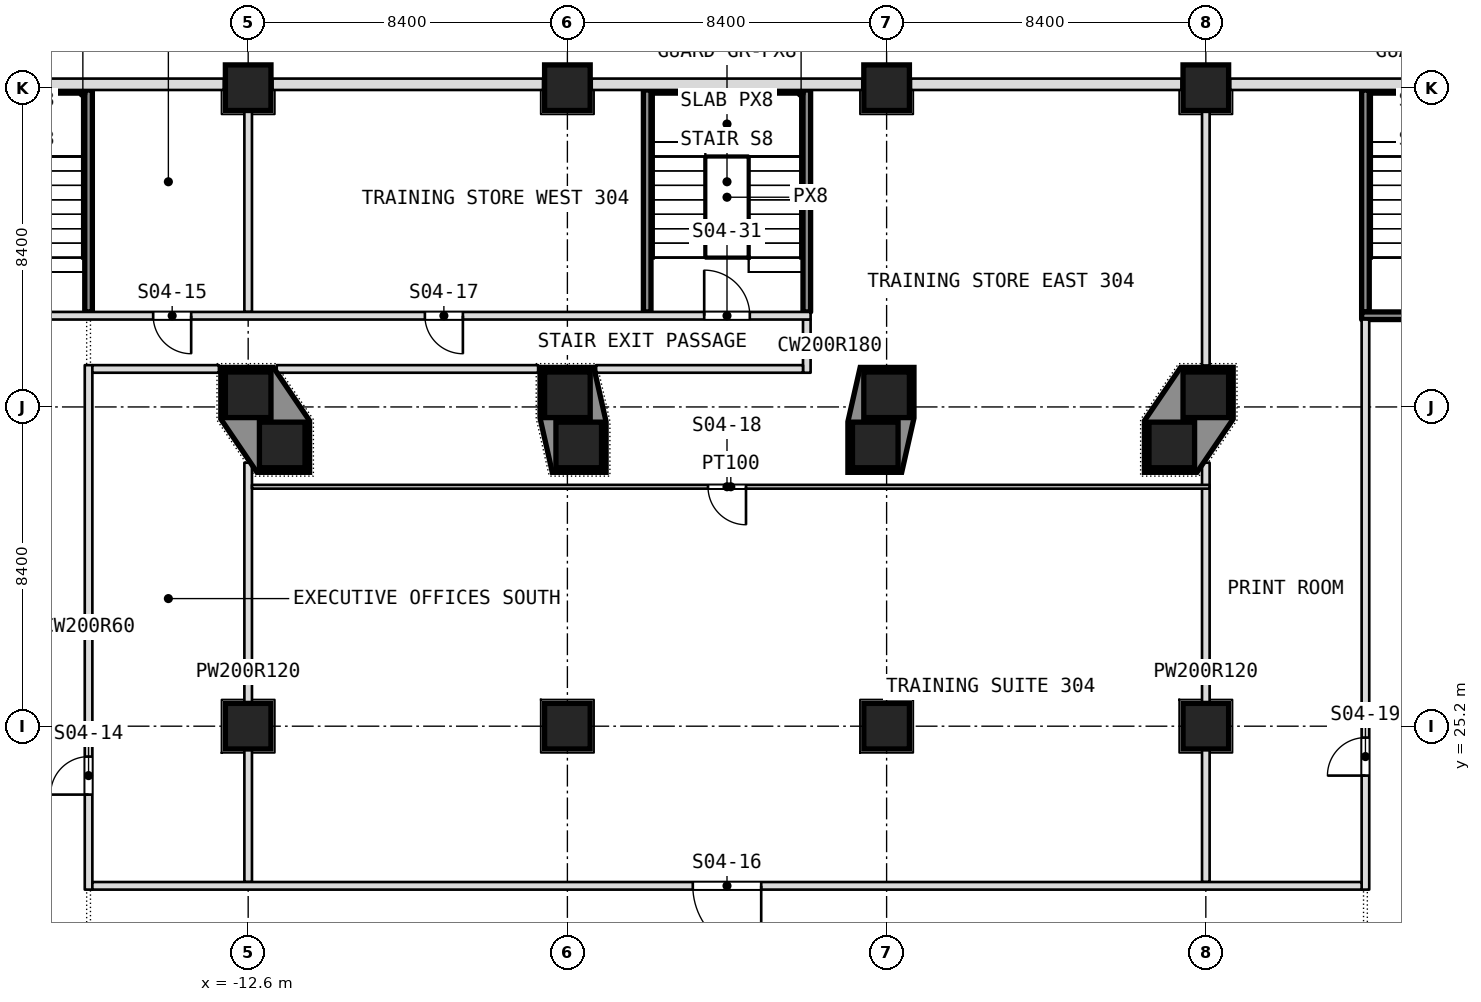
"""IFC4 building model, lengths in metres.
Left out: names, types, materials, properties, quantities, classifications, styles, units other than length and angle.
Written with IfcOpenShell. Run it as: python <this file> out.ifc"""

import sys

from ifc_helpers import new_model, si_unit, direction, frame, frame_2d, origin, origin_2d, place, context, subcontext, project, spatial, polyline, rectangle, outline, extrude, element, fill, save


model = new_model("IFC4")
c1 = context("Model", 3, precision=1e-05, world=origin(), true_north=direction((0.0, 1.0)))
c2 = subcontext(c1, "Body", "Model", "MODEL_VIEW")
j1 = project(units=[si_unit("LENGTHUNIT", "METRE"), si_unit("PLANEANGLEUNIT", "RADIAN")], contexts=[c1])
p1 = place(None, origin())
s1 = spatial("IfcSite", under=j1, at=p1, CompositionType="ELEMENT")
p2 = place(p1, origin())
s2 = spatial("IfcBuilding", under=s1, at=p2, CompositionType="ELEMENT")
p3 = place(p2, frame((0.0, 0.0, 21.0)))
s3 = spatial("IfcBuildingStorey", under=s2, at=p3, CompositionType="ELEMENT", Elevation=21.0)
for number, where, z_axis, x_axis in (
    (1, (-12.6, 25.2, 0.0), (0.0, 0.0, 1.0), (1.0, 0.0, 0.0)),
    (2, (-4.2, 25.2, 0.0), (0.0, 0.0, 1.0), (1.0, 0.0, 0.0)),
    (3, (4.2, 25.2, 0.0), (0.0, 0.0, 1.0), (1.0, 0.0, 0.0)),
    (4, (12.6, 25.2, 0.0), (0.0, 0.0, 1.0), (1.0, 0.0, 0.0)),
    (5, (-12.6, 33.92, 0.0), (0.0, 0.0, 1.0), (1.0, 0.0, 0.0)),
    (6, (-4.2, 33.92, 0.0), (0.0, 0.0, 1.0), (1.0, 0.0, 0.0)),
    (7, (4.2, 33.92, 0.0), (0.0, 0.0, 1.0), (1.0, 0.0, 0.0)),
    (8, (12.6, 33.92, 0.0), (0.0, 0.0, 1.0), (1.0, 0.0, 0.0)),
    (9, (-12.6, 42.0, 0.0), (0.0, 0.0, 1.0), (1.0, 0.0, 0.0)),
    (10, (-4.2, 42.0, 0.0), (0.0, 0.0, 1.0), (1.0, 0.0, 0.0)),
    (11, (4.2, 42.0, 0.0), (0.0, 0.0, 1.0), (1.0, 0.0, 0.0)),
    (12, (12.6, 42.0, 0.0), (0.0, 0.0, 1.0), (1.0, 0.0, 0.0)),
    (13, (-11.704, 32.6, 0.0), (0.0, 0.0, 1.0), (1.0, 0.0, 0.0)),
    (14, (-3.901, 32.6, 0.0), (0.0, 0.0, 1.0), (1.0, 0.0, 0.0)),
    (15, (3.901, 32.6, 0.0), (0.0, 0.0, 1.0), (1.0, 0.0, 0.0)),
    (16, (11.704, 32.6, 0.0), (0.0, 0.0, 1.0), (1.0, 0.0, 0.0)),
):
    element("IfcColumn", number, at=place(p3, frame(where, z_axis=z_axis, x_axis=x_axis)), inside=s3, PredefinedType="COLUMN", context=c2, shape_type="SweptSolid", body=[
        extrude(rectangle(XDim=1.2, YDim=1.2, at=origin_2d()), origin(), (0.0, 0.0, 1.0), 5.0),
    ])
p4 = place(p3, frame((16.8, 20.9, 0.0), z_axis=(0.0, 0.0, 1.0), x_axis=(0.0, 1.0, 0.0)))
e17 = element("IfcWall", 17, at=p4, inside=s3, PredefinedType="PARTITIONING", context=c2, shape_type="SweptSolid", body=[
    extrude(rectangle(XDim=15.0, YDim=0.2, at=frame_2d((7.5, 0.0))), origin(), (0.0, 0.0, 1.0), 4.68),
])
p5 = place(p4, frame((3.0, 0.0, 0.0)))
e18 = element("IfcOpeningElement", 18, at=p5, cuts=e17, PredefinedType="OPENING", context=c2, shape_type="SweptSolid", body=[
    extrude(rectangle(XDim=1.0, YDim=2.1, at=frame_2d((0.5, 1.05))), frame((0.0, 0.1, 0.0), z_axis=(0.0, -1.0, 0.0), x_axis=(1.0, 0.0, 0.0)), (0.0, 0.0, 1.0), 0.2),
])
p6 = place(p3, frame((16.8, 36.1, 0.0), z_axis=(0.0, 0.0, 1.0), x_axis=(0.0, 1.0, 0.0)))
e19 = element("IfcWall", 19, at=p6, inside=s3, PredefinedType="PARTITIONING", context=c2, shape_type="SweptSolid", body=[
    extrude(rectangle(XDim=5.84, YDim=0.2, at=frame_2d((2.92, 0.0))), origin(), (0.0, 0.0, 1.0), 4.68),
])
p7 = place(p3, frame((12.6, 21.1, 0.0), z_axis=(0.0, 0.0, 1.0), x_axis=(0.0, 1.0, 0.0)))
e20 = element("IfcWall", 20, at=p7, inside=s3, PredefinedType="PARTITIONING", context=c2, shape_type="SweptSolid", body=[
    extrude(rectangle(XDim=11.033, YDim=0.2, at=frame_2d((5.517, 0.0))), origin(), (0.0, 0.0, 1.0), 4.68),
])
p8 = place(p3, frame((12.6, 34.69, 0.0), z_axis=(0.0, 0.0, 1.0), x_axis=(0.0, 1.0, 0.0)))
e21 = element("IfcWall", 21, at=p8, inside=s3, PredefinedType="PARTITIONING", context=c2, shape_type="SweptSolid", body=[
    extrude(rectangle(XDim=7.61, YDim=0.2, at=frame_2d((3.805, 0.0))), origin(), (0.0, 0.0, 1.0), 4.68),
])
p9 = place(p3, frame((2.1, 36.1, 0.0), z_axis=(0.0, 0.0, 1.0), x_axis=(0.0, 1.0, 0.0)))
e22 = element("IfcWall", 22, at=p9, inside=s3, PredefinedType="PARTITIONING", context=c2, shape_type="SweptSolid", body=[
    extrude(rectangle(XDim=5.84, YDim=0.2, at=frame_2d((2.92, 0.0))), origin(), (0.0, 0.0, 1.0), 4.68),
])
p10 = place(p3, frame((2.1, 34.5, 0.0), z_axis=(0.0, 0.0, 1.0), x_axis=(0.0, 1.0, 0.0)))
e23 = element("IfcWall", 23, at=p10, inside=s3, PredefinedType="PARTITIONING", context=c2, shape_type="SweptSolid", body=[
    extrude(rectangle(XDim=1.4, YDim=0.2, at=frame_2d((0.7, 0.0))), origin(), (0.0, 0.0, 1.0), 4.68),
])
p11 = place(p3, frame((-2.1, 36.1, 0.0), z_axis=(0.0, 0.0, 1.0), x_axis=(0.0, 1.0, 0.0)))
e24 = element("IfcWall", 24, at=p11, inside=s3, PredefinedType="PARTITIONING", context=c2, shape_type="SweptSolid", body=[
    extrude(rectangle(XDim=5.84, YDim=0.2, at=frame_2d((2.92, 0.0))), origin(), (0.0, 0.0, 1.0), 4.68),
])
p12 = place(p3, frame((-12.6, 21.1, 0.0), z_axis=(0.0, 0.0, 1.0), x_axis=(0.0, 1.0, 0.0)))
e25 = element("IfcWall", 25, at=p12, inside=s3, PredefinedType="PARTITIONING", context=c2, shape_type="SweptSolid", body=[
    extrude(rectangle(XDim=11.033, YDim=0.2, at=frame_2d((5.517, 0.0))), origin(), (0.0, 0.0, 1.0), 4.68),
])
p13 = place(p3, frame((-12.6, 36.1, 0.0), z_axis=(0.0, 0.0, 1.0), x_axis=(0.0, 1.0, 0.0)))
e26 = element("IfcWall", 26, at=p13, inside=s3, PredefinedType="PARTITIONING", context=c2, shape_type="SweptSolid", body=[
    extrude(rectangle(XDim=6.2, YDim=0.2, at=frame_2d((3.1, 0.0))), origin(), (0.0, 0.0, 1.0), 4.68),
])
p14 = place(p3, frame((-16.8, 20.9, 0.0), z_axis=(0.0, 0.0, 1.0), x_axis=(0.0, 1.0, 0.0)))
e27 = element("IfcWall", 27, at=p14, inside=s3, PredefinedType="PARTITIONING", context=c2, shape_type="SweptSolid", body=[
    extrude(rectangle(XDim=13.8, YDim=0.2, at=frame_2d((6.9, 0.0))), origin(), (0.0, 0.0, 1.0), 4.68),
])
p15 = place(p14, frame((2.5, 0.0, 0.0)))
e28 = element("IfcOpeningElement", 28, at=p15, cuts=e27, PredefinedType="OPENING", context=c2, shape_type="SweptSolid", body=[
    extrude(rectangle(XDim=1.0, YDim=2.1, at=frame_2d((0.5, 1.05))), frame((0.0, 0.1, 0.0), z_axis=(0.0, -1.0, 0.0), x_axis=(1.0, 0.0, 0.0)), (0.0, 0.0, 1.0), 0.2),
])
p16 = place(p3, frame((-16.8, 36.1, 0.0), z_axis=(0.0, 0.0, 1.0), x_axis=(0.0, 1.0, 0.0)))
e29 = element("IfcWall", 29, at=p16, inside=s3, PredefinedType="PARTITIONING", context=c2, shape_type="SweptSolid", body=[
    extrude(rectangle(XDim=5.84, YDim=0.2, at=frame_2d((2.92, 0.0))), origin(), (0.0, 0.0, 1.0), 4.68),
])
p17 = place(p3, frame((-16.7, 21.0, 0.0), z_axis=(0.0, 0.0, 1.0), x_axis=(1.0, 0.0, 0.0)))
e30 = element("IfcWall", 30, at=p17, inside=s3, PredefinedType="PARTITIONING", context=c2, shape_type="SweptSolid", body=[
    extrude(rectangle(XDim=33.4, YDim=0.2, at=frame_2d((16.7, 0.0))), origin(), (0.0, 0.0, 1.0), 4.68),
])
p18 = place(p17, frame((15.8, 0.0, 0.0)))
e31 = element("IfcOpeningElement", 31, at=p18, cuts=e30, PredefinedType="OPENING", context=c2, shape_type="SweptSolid", body=[
    extrude(rectangle(XDim=1.8, YDim=2.1, at=frame_2d((0.9, 1.05))), frame((0.0, 0.1, 0.0), z_axis=(0.0, -1.0, 0.0), x_axis=(1.0, 0.0, 0.0)), (0.0, 0.0, 1.0), 0.2),
])
p19 = place(p3, frame((-12.5, 31.5, 0.0), z_axis=(0.0, 0.0, 1.0), x_axis=(1.0, 0.0, 0.0)))
e32 = element("IfcWall", 32, at=p19, inside=s3, PredefinedType="PARTITIONING", context=c2, shape_type="SweptSolid", body=[
    extrude(rectangle(XDim=25.2, YDim=0.1, at=frame_2d((12.6, 0.0))), origin(), (0.0, 0.0, 1.0), 4.68),
])
p20 = place(p19, frame((12.0, 0.0, 0.0)))
e33 = element("IfcOpeningElement", 33, at=p20, cuts=e32, PredefinedType="OPENING", context=c2, shape_type="SweptSolid", body=[
    extrude(rectangle(XDim=1.0, YDim=2.1, at=frame_2d((0.5, 1.05))), frame((0.0, 0.05, 0.0), z_axis=(0.0, -1.0, 0.0), x_axis=(1.0, 0.0, 0.0)), (0.0, 0.0, 1.0), 0.1),
])
p21 = place(p3, frame((-16.7, 34.6, 0.0), z_axis=(0.0, 0.0, 1.0), x_axis=(1.0, 0.0, 0.0)))
e34 = element("IfcWall", 34, at=p21, inside=s3, PredefinedType="PARTITIONING", context=c2, shape_type="SweptSolid", body=[
    extrude(rectangle(XDim=3.33, YDim=0.2, at=frame_2d((1.665, 0.0))), origin(), (0.0, 0.0, 1.0), 4.68),
])
p22 = place(p3, frame((-11.849, 34.6, 0.0), z_axis=(0.0, 0.0, 1.0), x_axis=(1.0, 0.0, 0.0)))
e35 = element("IfcWall", 35, at=p22, inside=s3, PredefinedType="PARTITIONING", context=c2, shape_type="SweptSolid", body=[
    extrude(rectangle(XDim=6.879, YDim=0.2, at=frame_2d((3.439, 0.0))), origin(), (0.0, 0.0, 1.0), 4.68),
])
p23 = place(p3, frame((-3.444, 34.6, 0.0), z_axis=(0.0, 0.0, 1.0), x_axis=(1.0, 0.0, 0.0)))
e36 = element("IfcWall", 36, at=p23, inside=s3, PredefinedType="PARTITIONING", context=c2, shape_type="SweptSolid", body=[
    extrude(rectangle(XDim=5.444, YDim=0.2, at=frame_2d((2.722, 0.0))), origin(), (0.0, 0.0, 1.0), 4.68),
])
p24 = place(p3, frame((-21.1, 36.0, 0.0), z_axis=(0.0, 0.0, 1.0), x_axis=(1.0, 0.0, 0.0)))
e37 = element("IfcWall", 37, at=p24, inside=s3, PredefinedType="PARTITIONING", context=c2, shape_type="SweptSolid", body=[
    extrude(rectangle(XDim=23.3, YDim=0.2, at=frame_2d((11.65, 0.0))), origin(), (0.0, 0.0, 1.0), 4.68),
])
p25 = place(p24, frame((1.6, 0.0, 0.0)))
e38 = element("IfcOpeningElement", 38, at=p25, cuts=e37, PredefinedType="OPENING", context=c2, shape_type="SweptSolid", body=[
    extrude(rectangle(XDim=1.2, YDim=2.1, at=frame_2d((0.6, 1.05))), frame((0.0, 0.1, 0.0), z_axis=(0.0, -1.0, 0.0), x_axis=(1.0, 0.0, 0.0)), (0.0, 0.0, 1.0), 0.2),
])
p26 = place(p24, frame((6.0, 0.0, 0.0)))
e39 = element("IfcOpeningElement", 39, at=p26, cuts=e37, PredefinedType="OPENING", context=c2, shape_type="SweptSolid", body=[
    extrude(rectangle(XDim=1.0, YDim=2.1, at=frame_2d((0.5, 1.05))), frame((0.0, 0.1, 0.0), z_axis=(0.0, -1.0, 0.0), x_axis=(1.0, 0.0, 0.0)), (0.0, 0.0, 1.0), 0.2),
])
p27 = place(p24, frame((13.15, 0.0, 0.0)))
e40 = element("IfcOpeningElement", 40, at=p27, cuts=e37, PredefinedType="OPENING", context=c2, shape_type="SweptSolid", body=[
    extrude(rectangle(XDim=1.0, YDim=2.1, at=frame_2d((0.5, 1.05))), frame((0.0, 0.1, 0.0), z_axis=(0.0, -1.0, 0.0), x_axis=(1.0, 0.0, 0.0)), (0.0, 0.0, 1.0), 0.2),
])
p28 = place(p24, frame((20.5, 0.0, 0.0)))
e41 = element("IfcOpeningElement", 41, at=p28, cuts=e37, PredefinedType="OPENING", context=c2, shape_type="SweptSolid", body=[
    extrude(rectangle(XDim=1.2, YDim=2.1, at=frame_2d((0.6, 1.05))), frame((0.0, 0.1, 0.0), z_axis=(0.0, -1.0, 0.0), x_axis=(1.0, 0.0, 0.0)), (0.0, 0.0, 1.0), 0.2),
])
p29 = place(p3, frame((16.7, 36.0, 0.0), z_axis=(0.0, 0.0, 1.0), x_axis=(1.0, 0.0, 0.0)))
e42 = element("IfcWall", 42, at=p29, inside=s3, PredefinedType="PARTITIONING", context=c2, shape_type="SweptSolid", body=[
    extrude(rectangle(XDim=4.4, YDim=0.2, at=frame_2d((2.2, 0.0))), origin(), (0.0, 0.0, 1.0), 4.68),
])
p30 = place(p29, frame((1.6, 0.0, 0.0)))
e43 = element("IfcOpeningElement", 43, at=p30, cuts=e42, PredefinedType="OPENING", context=c2, shape_type="SweptSolid", body=[
    extrude(rectangle(XDim=1.2, YDim=2.1, at=frame_2d((0.6, 1.05))), frame((0.0, 0.1, 0.0), z_axis=(0.0, -1.0, 0.0), x_axis=(1.0, 0.0, 0.0)), (0.0, 0.0, 1.0), 0.2),
])
p31 = place(p3, frame((20.36, 42.09, 0.0), z_axis=(0.0, 0.0, 1.0), x_axis=(-1.0, 0.0, 0.0)))
e44 = element("IfcWall", 44, at=p31, inside=s3, PredefinedType="NOTDEFINED", context=c2, shape_type="SweptSolid", body=[
    extrude(rectangle(XDim=7.12, YDim=0.3, at=frame_2d((3.56, 0.0))), origin(), (0.0, 0.0, 1.0), 3.78),
])
p32 = place(p3, frame((11.96, 42.09, 0.0), z_axis=(0.0, 0.0, 1.0), x_axis=(-1.0, 0.0, 0.0)))
e45 = element("IfcWall", 45, at=p32, inside=s3, PredefinedType="NOTDEFINED", context=c2, shape_type="SweptSolid", body=[
    extrude(rectangle(XDim=7.12, YDim=0.3, at=frame_2d((3.56, 0.0))), origin(), (0.0, 0.0, 1.0), 3.78),
])
p33 = place(p3, frame((3.56, 42.09, 0.0), z_axis=(0.0, 0.0, 1.0), x_axis=(-1.0, 0.0, 0.0)))
e46 = element("IfcWall", 46, at=p33, inside=s3, PredefinedType="NOTDEFINED", context=c2, shape_type="SweptSolid", body=[
    extrude(rectangle(XDim=7.12, YDim=0.3, at=frame_2d((3.56, 0.0))), origin(), (0.0, 0.0, 1.0), 3.78),
])
p34 = place(p3, frame((-4.84, 42.09, 0.0), z_axis=(0.0, 0.0, 1.0), x_axis=(-1.0, 0.0, 0.0)))
e47 = element("IfcWall", 47, at=p34, inside=s3, PredefinedType="NOTDEFINED", context=c2, shape_type="SweptSolid", body=[
    extrude(rectangle(XDim=7.12, YDim=0.3, at=frame_2d((3.56, 0.0))), origin(), (0.0, 0.0, 1.0), 3.78),
])
p35 = place(p3, frame((-13.24, 42.09, 0.0), z_axis=(0.0, 0.0, 1.0), x_axis=(-1.0, 0.0, 0.0)))
e48 = element("IfcWall", 48, at=p35, inside=s3, PredefinedType="NOTDEFINED", context=c2, shape_type="SweptSolid", body=[
    extrude(rectangle(XDim=7.12, YDim=0.3, at=frame_2d((3.56, 0.0))), origin(), (0.0, 0.0, 1.0), 3.78),
])
p36 = place(p3, origin())
e49 = element("IfcWall", 49, at=p36, inside=s3, PredefinedType="SOLIDWALL", context=c2, shape_type="SweptSolid", body=[
    extrude(outline(polyline([(-13.32, 34.64), (-11.937, 34.64), (-10.984, 33.237), (-10.984, 31.88), (-12.368, 31.88), (-13.32, 33.283), (-13.32, 34.64)]), holes=[polyline([(-11.104, 32.0), (-11.104, 33.2), (-12.304, 33.2), (-12.304, 32.0), (-11.104, 32.0)]), polyline([(-12.0, 33.32), (-12.0, 34.52), (-13.2, 34.52), (-13.2, 33.32), (-12.0, 33.32)])]), origin(), (0.0, 0.0, 1.0), 5.0),
])
p37 = place(p3, origin())
e50 = element("IfcWall", 50, at=p37, inside=s3, PredefinedType="SOLIDWALL", context=c2, shape_type="SweptSolid", body=[
    extrude(outline(polyline([(-4.92, 33.307), (-4.92, 34.64), (-3.504, 34.64), (-3.181, 33.213), (-3.181, 31.88), (-4.597, 31.88), (-4.92, 33.307)]), holes=[polyline([(-4.501, 32.0), (-3.302, 32.0), (-3.302, 33.2), (-4.501, 33.2), (-4.501, 32.0)]), polyline([(-4.8, 33.32), (-3.6, 33.32), (-3.6, 34.52), (-4.8, 34.52), (-4.8, 33.32)])]), origin(), (0.0, 0.0, 1.0), 5.0),
])
p38 = place(p3, origin())
e51 = element("IfcWall", 51, at=p38, inside=s3, PredefinedType="SOLIDWALL", context=c2, shape_type="SweptSolid", body=[
    extrude(outline(polyline([(3.181, 33.213), (3.504, 34.64), (4.92, 34.64), (4.92, 33.307), (4.597, 31.88), (3.181, 31.88), (3.181, 33.213)]), holes=[polyline([(3.6, 33.32), (4.8, 33.32), (4.8, 34.52), (3.6, 34.52), (3.6, 33.32)]), polyline([(3.302, 32.0), (4.501, 32.0), (4.501, 33.2), (3.302, 33.2), (3.302, 32.0)])]), origin(), (0.0, 0.0, 1.0), 5.0),
])
p39 = place(p3, origin())
e52 = element("IfcWall", 52, at=p39, inside=s3, PredefinedType="SOLIDWALL", context=c2, shape_type="SweptSolid", body=[
    extrude(outline(polyline([(10.984, 33.237), (11.937, 34.64), (13.32, 34.64), (13.32, 33.283), (12.368, 31.88), (10.984, 31.88), (10.984, 33.237)]), holes=[polyline([(12.0, 33.32), (13.2, 33.32), (13.2, 34.52), (12.0, 34.52), (12.0, 33.32)]), polyline([(11.104, 32.0), (12.304, 32.0), (12.304, 33.2), (11.104, 33.2), (11.104, 32.0)])]), origin(), (0.0, 0.0, 1.0), 5.0),
])
p40 = place(p15, origin())
e53 = element("IfcDoor", 53, at=p40, inside=s3, OperationType="SINGLE_SWING_LEFT", PredefinedType="DOOR", context=c2, shape_type="SweptSolid", body=[
    extrude(rectangle(XDim=1.0, YDim=2.1, at=frame_2d((0.5, 1.05))), frame((0.0, 0.025, 0.0), z_axis=(0.0, -1.0, 0.0), x_axis=(1.0, 0.0, 0.0)), (0.0, 0.0, 1.0), 0.05),
])
fill(e28, e53)
p41 = place(p26, origin())
e54 = element("IfcDoor", 54, at=p41, inside=s3, OperationType="SINGLE_SWING_LEFT", PredefinedType="DOOR", context=c2, shape_type="SweptSolid", body=[
    extrude(rectangle(XDim=1.0, YDim=2.1, at=frame_2d((0.5, 1.05))), frame((0.0, 0.025, 0.0), z_axis=(0.0, -1.0, 0.0), x_axis=(1.0, 0.0, 0.0)), (0.0, 0.0, 1.0), 0.05),
])
fill(e39, e54)
p42 = place(p18, origin())
e55 = element("IfcDoor", 55, at=p42, inside=s3, OperationType="DOUBLE_DOOR_SINGLE_SWING", PredefinedType="DOOR", context=c2, shape_type="SweptSolid", body=[
    extrude(rectangle(XDim=1.8, YDim=2.1, at=frame_2d((0.9, 1.05))), frame((0.0, 0.025, 0.0), z_axis=(0.0, -1.0, 0.0), x_axis=(1.0, 0.0, 0.0)), (0.0, 0.0, 1.0), 0.05),
])
fill(e31, e55)
p43 = place(p27, origin())
e56 = element("IfcDoor", 56, at=p43, inside=s3, OperationType="SINGLE_SWING_RIGHT", PredefinedType="DOOR", context=c2, shape_type="SweptSolid", body=[
    extrude(rectangle(XDim=1.0, YDim=2.1, at=frame_2d((0.5, 1.05))), frame((0.0, 0.025, 0.0), z_axis=(0.0, -1.0, 0.0), x_axis=(1.0, 0.0, 0.0)), (0.0, 0.0, 1.0), 0.05),
])
fill(e40, e56)
p44 = place(p20, origin())
e57 = element("IfcDoor", 57, at=p44, inside=s3, OperationType="SINGLE_SWING_LEFT", PredefinedType="DOOR", context=c2, shape_type="SweptSolid", body=[
    extrude(rectangle(XDim=1.0, YDim=2.1, at=frame_2d((0.5, 1.05))), frame((0.0, 0.025, 0.0), z_axis=(0.0, -1.0, 0.0), x_axis=(1.0, 0.0, 0.0)), (0.0, 0.0, 1.0), 0.05),
])
fill(e33, e57)
p45 = place(p5, origin())
e58 = element("IfcDoor", 58, at=p45, inside=s3, OperationType="SINGLE_SWING_RIGHT", PredefinedType="DOOR", context=c2, shape_type="SweptSolid", body=[
    extrude(rectangle(XDim=1.0, YDim=2.1, at=frame_2d((0.5, 1.05))), frame((0.0, 0.025, 0.0), z_axis=(0.0, -1.0, 0.0), x_axis=(1.0, 0.0, 0.0)), (0.0, 0.0, 1.0), 0.05),
])
fill(e18, e58)
p46 = place(p28, origin())
e59 = element("IfcDoor", 59, at=p46, inside=s3, OperationType="SINGLE_SWING_LEFT", PredefinedType="DOOR", context=c2, shape_type="SweptSolid", body=[
    extrude(rectangle(XDim=1.2, YDim=2.1, at=frame_2d((0.6, 1.05))), frame((0.0, 0.025, 0.0), z_axis=(0.0, -1.0, 0.0), x_axis=(1.0, 0.0, 0.0)), (0.0, 0.0, 1.0), 0.05),
])
fill(e41, e59)
save(model, sys.argv[1])
